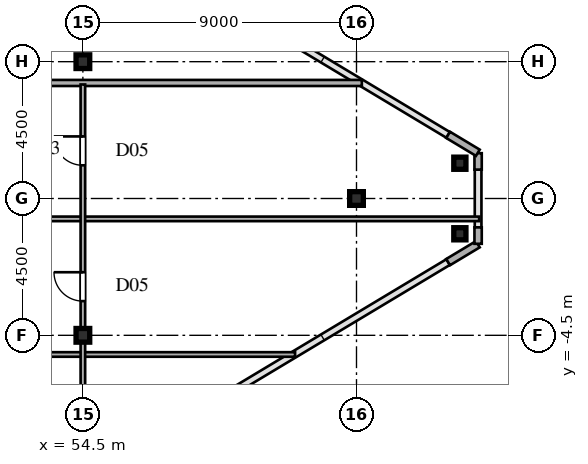
"""IFC4 building model, lengths in metres.
Left out: names, types, materials, properties, quantities, classifications, styles, units other than length and angle.
Written with IfcOpenShell. Run it as: python <this file> out.ifc"""

import sys

from ifc_helpers import new_model, si_unit, direction, frame, frame_2d, origin, origin_2d, place, context, subcontext, project, spatial, rectangle, hollow_rectangle, i_section, extrude, source, transform, mapped, element, fill, save


model = new_model("IFC4")
c1 = context("Model", 3, precision=1e-05, world=origin(), true_north=direction((0.0, 1.0)))
c2 = subcontext(c1, "Body", "Model", "MODEL_VIEW")
j1 = project(units=[si_unit("LENGTHUNIT", "METRE"), si_unit("PLANEANGLEUNIT", "RADIAN")], contexts=[c1])
p1 = place(None, origin())
s1 = spatial("IfcSite", under=j1, at=p1, CompositionType="ELEMENT")
p2 = place(p1, origin())
s2 = spatial("IfcBuilding", under=s1, at=p2, CompositionType="ELEMENT")
p3 = place(p2, frame((0.0, 0.0, 258.15)))
s3 = spatial("IfcBuildingStorey", under=s2, at=p3, CompositionType="ELEMENT", Elevation=258.15)
m1 = source(origin(), c2, "Body", "SweptSolid", [
    extrude(i_section(OverallWidth=0.45, OverallDepth=0.45, WebThickness=0.016, FlangeThickness=0.025, at=origin_2d()), origin(), (0.0, 0.0, 1.0), 3.75),
])
for number, where, z_axis, x_axis in (
    (1, (54.5, -4.5, 0.0), (0.0, 0.0, 1.0), (1.0, 0.0, 0.0)),
    (2, (54.5, 4.5, 0.0), (0.0, 0.0, 1.0), (1.0, 0.0, 0.0)),
    (3, (63.5, 0.0, 0.0), (0.0, 0.0, 1.0), (1.0, 0.0, 0.0)),
):
    element("IfcColumn", number, at=place(p3, frame(where, z_axis=z_axis, x_axis=x_axis)), inside=s3, PredefinedType="COLUMN", context=c2, shape_type="MappedRepresentation", body=[
        mapped(m1, transform((0.0, 0.0, 0.0), scale=1.0)),
    ])
m2 = source(origin(), c2, "Body", "SweptSolid", [
    extrude(hollow_rectangle(XDim=0.4, YDim=0.4, WallThickness=0.016, at=origin_2d()), origin(), (0.0, 0.0, 1.0), 3.75),
])
for number, where, z_axis, x_axis in (
    (4, (66.9, -1.16, 0.0), (0.0, 0.0, 1.0), (1.0, 0.0, 0.0)),
    (5, (66.9, 1.16, 0.0), (0.0, 0.0, 1.0), (1.0, 0.0, 0.0)),
):
    element("IfcColumn", number, at=place(p3, frame(where, z_axis=z_axis, x_axis=x_axis)), inside=s3, PredefinedType="COLUMN", context=c2, shape_type="MappedRepresentation", body=[
        mapped(m2, transform((0.0, 0.0, 0.0), scale=1.0)),
    ])
p4 = place(p3, frame((66.514, -2.092, 0.0), z_axis=(0.0, 0.0, 1.0), x_axis=(0.85743623509, 0.514590228002, 0.0)))
e6 = element("IfcWall", 6, at=p4, inside=s3, PredefinedType="SOLIDWALL", context=c2, shape_type="SweptSolid", body=[
    extrude(rectangle(XDim=1.14, YDim=0.24, at=frame_2d((0.57, 0.0))), origin(), (0.0, 0.0, 1.0), 3.53),
])
for number, where, z_axis, x_axis in (
    (7, (67.5, -1.49, 0.0), (0.0, 0.0, 1.0), (0.0, 1.0, 0.0)),
    (8, (67.5, 0.95, 0.0), (0.0, 0.0, 1.0), (0.0, 1.0, 0.0)),
):
    element("IfcWall", number, at=place(p3, frame(where, z_axis=z_axis, x_axis=x_axis)), inside=s3, PredefinedType="SOLIDWALL", context=c2, shape_type="SweptSolid", body=[
        extrude(rectangle(XDim=0.54, YDim=0.24, at=frame_2d((0.27, 0.0))), origin(), (0.0, 0.0, 1.0), 3.53),
    ])
p5 = place(p3, frame((67.491, 1.505, 0.0), z_axis=(0.0, 0.0, 1.0), x_axis=(-0.85743623509, 0.514590228002, 0.0)))
e9 = element("IfcWall", 9, at=p5, inside=s3, PredefinedType="SOLIDWALL", context=c2, shape_type="SweptSolid", body=[
    extrude(rectangle(XDim=1.14, YDim=0.24, at=frame_2d((0.57, 0.0))), origin(), (0.0, 0.0, 1.0), 3.53),
])
p6 = place(p3, frame((43.5, -5.13, 0.0), z_axis=(0.0, 0.0, 1.0), x_axis=(1.0, 0.0, 0.0)))
e10 = element("IfcWall", 10, at=p6, inside=s3, PredefinedType="PARTITIONING", context=c2, shape_type="SweptSolid", body=[
    extrude(rectangle(XDim=17.98, YDim=0.15, at=frame_2d((8.99, 0.0))), origin(), (0.0, 0.0, 1.0), 3.53),
])
p7 = place(p6, frame((5.0, 0.0, 0.0)))
e11 = element("IfcOpeningElement", 11, at=p7, cuts=e10, PredefinedType="OPENING", context=c2, shape_type="SweptSolid", body=[
    extrude(rectangle(XDim=0.95, YDim=2.15, at=frame_2d((0.475, 1.075))), frame((0.0, 0.085, 0.0), z_axis=(0.0, -1.0, 0.0), x_axis=(1.0, 0.0, 0.0)), (0.0, 0.0, 1.0), 0.17),
])
p8 = place(p3, frame((43.5, -0.67, 0.0), z_axis=(0.0, 0.0, 1.0), x_axis=(1.0, 0.0, 0.0)))
e12 = element("IfcWall", 12, at=p8, inside=s3, PredefinedType="PARTITIONING", context=c2, shape_type="SweptSolid", body=[
    extrude(rectangle(XDim=24.035, YDim=0.15, at=frame_2d((12.018, 0.0))), origin(), (0.0, 0.0, 1.0), 3.53),
])
p9 = place(p8, frame((5.0, 0.0, 0.0)))
e13 = element("IfcOpeningElement", 13, at=p9, cuts=e12, PredefinedType="OPENING", context=c2, shape_type="SweptSolid", body=[
    extrude(rectangle(XDim=0.95, YDim=2.15, at=frame_2d((0.475, 1.075))), frame((0.0, 0.085, 0.0), z_axis=(0.0, -1.0, 0.0), x_axis=(1.0, 0.0, 0.0)), (0.0, 0.0, 1.0), 0.17),
])
p10 = place(p3, frame((38.63, 3.8, 0.0), z_axis=(0.0, 0.0, 1.0), x_axis=(1.0, 0.0, 0.0)))
e14 = element("IfcWall", 14, at=p10, inside=s3, PredefinedType="PARTITIONING", context=c2, shape_type="SweptSolid", body=[
    extrude(rectangle(XDim=25.046, YDim=0.2, at=frame_2d((12.523, 0.0))), origin(), (0.0, 0.0, 1.0), 3.53),
])
p11 = place(p3, frame((54.5, -9.335, 0.0), z_axis=(0.0, 0.0, 1.0), x_axis=(0.0, 1.0, 0.0)))
e15 = element("IfcWall", 15, at=p11, inside=s3, PredefinedType="PARTITIONING", context=c2, shape_type="SweptSolid", body=[
    extrude(rectangle(XDim=13.085, YDim=0.15, at=frame_2d((6.542, 0.0))), origin(), (0.0, 0.0, 1.0), 2.93),
])
p12 = place(p11, frame((5.96, 0.0, 0.0)))
e16 = element("IfcOpeningElement", 16, at=p12, cuts=e15, PredefinedType="OPENING", context=c2, shape_type="SweptSolid", body=[
    extrude(rectangle(XDim=0.95, YDim=2.15, at=frame_2d((0.475, 1.075))), frame((0.0, 0.085, 0.0), z_axis=(0.0, -1.0, 0.0), x_axis=(1.0, 0.0, 0.0)), (0.0, 0.0, 1.0), 0.17),
])
p13 = place(p11, frame((1.643, 0.0, 0.0)))
e17 = element("IfcOpeningElement", 17, at=p13, cuts=e15, PredefinedType="OPENING", context=c2, shape_type="SweptSolid", body=[
    extrude(rectangle(XDim=0.95, YDim=2.15, at=frame_2d((0.475, 1.075))), frame((0.0, 0.085, 0.0), z_axis=(0.0, -1.0, 0.0), x_axis=(1.0, 0.0, 0.0)), (0.0, 0.0, 1.0), 0.17),
])
p14 = place(p11, frame((10.427, 0.0, 0.0)))
e18 = element("IfcOpeningElement", 18, at=p14, cuts=e15, PredefinedType="OPENING", context=c2, shape_type="SweptSolid", body=[
    extrude(rectangle(XDim=0.95, YDim=2.15, at=frame_2d((0.475, 1.075))), frame((0.0, 0.085, 0.0), z_axis=(0.0, -1.0, 0.0), x_axis=(1.0, 0.0, 0.0)), (0.0, 0.0, 1.0), 0.17),
])
m3 = source(origin(), c2, "Body", "SweptSolid", [
    extrude(rectangle(XDim=0.95, YDim=2.15, at=frame_2d((0.475, 1.075))), frame((0.0, 0.025, 0.0), z_axis=(0.0, -1.0, 0.0), x_axis=(1.0, 0.0, 0.0)), (0.0, 0.0, 1.0), 0.05),
])
p15 = place(p12, origin())
e19 = element("IfcDoor", 19, at=p15, inside=s3, OperationType="SINGLE_SWING_RIGHT", PredefinedType="DOOR", context=c2, shape_type="MappedRepresentation", body=[
    mapped(m3, transform((0.0, 0.0, 0.0), scale=1.0)),
])
fill(e16, e19)
p16 = place(p14, origin())
e20 = element("IfcDoor", 20, at=p16, inside=s3, OperationType="SINGLE_SWING_RIGHT", PredefinedType="DOOR", context=c2, shape_type="MappedRepresentation", body=[
    mapped(m3, transform((0.0, 0.0, 0.0), scale=1.0)),
])
fill(e18, e20)
save(model, sys.argv[1])
